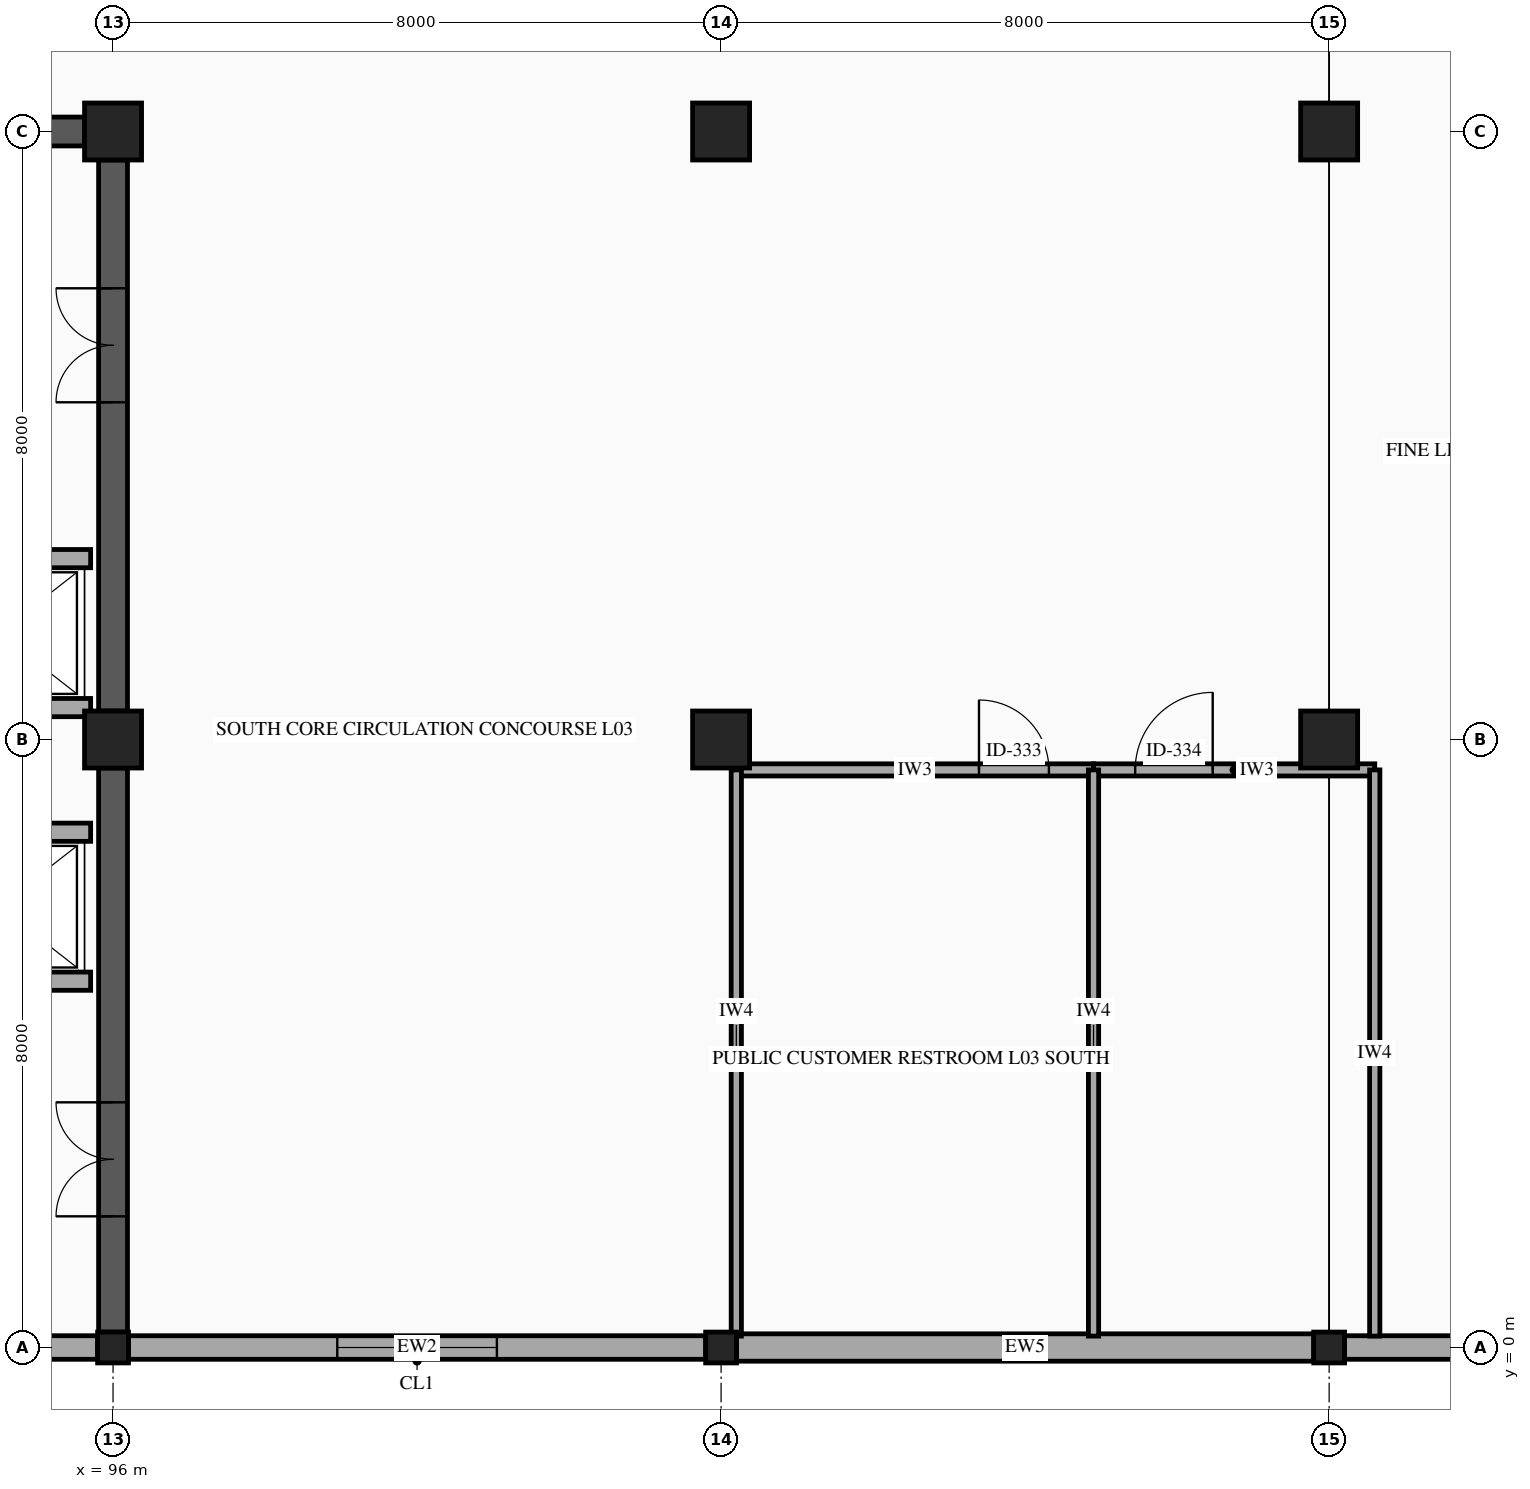
"""IFC4 building model, lengths in metres.
Left out: names, types, materials, properties, quantities, classifications, styles, units other than length and angle.
Written with IfcOpenShell. Run it as: python <this file> out.ifc"""

import sys

from ifc_helpers import new_model, si_unit, direction, frame, frame_2d, origin, origin_2d, place, context, subcontext, project, spatial, rectangle, hollow_rectangle, extrude, element, fill, save


model = new_model("IFC4")
c1 = context("Model", 3, precision=1e-05, world=origin(), true_north=direction((0.0, 1.0)))
c2 = subcontext(c1, "Body", "Model", "MODEL_VIEW")
j1 = project(units=[si_unit("LENGTHUNIT", "METRE"), si_unit("PLANEANGLEUNIT", "RADIAN")], contexts=[c1])
p1 = place(None, origin())
s1 = spatial("IfcSite", under=j1, at=p1, CompositionType="ELEMENT")
p2 = place(p1, origin())
s2 = spatial("IfcBuilding", under=s1, at=p2, CompositionType="ELEMENT")
p3 = place(p2, frame((0.0, 0.0, 14.9)))
s3 = spatial("IfcBuildingStorey", under=s2, at=p3, CompositionType="ELEMENT", Elevation=14.9)
p4 = place(p3, frame((96.0, 0.0, 0.0), z_axis=(0.0, 0.0, 1.0), x_axis=(1.0, 0.0, 0.0)))
e1 = element("IfcColumn", 1, at=p4, inside=s3, PredefinedType="COLUMN", context=c2, shape_type="SweptSolid", body=[
    extrude(hollow_rectangle(XDim=0.406, YDim=0.406, WallThickness=0.015, InnerFilletRadius=0.015, OuterFilletRadius=0.029, at=origin_2d()), origin(), (0.0, 0.0, 1.0), 4.5),
])
for number, where, z_axis, x_axis in (
    (2, (96.0, 8.0, 0.0), (0.0, 0.0, 1.0), (1.0, 0.0, 0.0)),
    (3, (96.0, 16.0, 0.0), (0.0, 0.0, 1.0), (1.0, 0.0, 0.0)),
):
    element("IfcColumn", number, at=place(p3, frame(where, z_axis=z_axis, x_axis=x_axis)), inside=s3, PredefinedType="COLUMN", context=c2, shape_type="SweptSolid", body=[
        extrude(rectangle(XDim=0.75, YDim=0.75, at=origin_2d()), origin(), (0.0, 0.0, 1.0), 4.5),
    ])
p5 = place(p3, frame((104.0, 0.0, 0.0), z_axis=(0.0, 0.0, 1.0), x_axis=(1.0, 0.0, 0.0)))
e4 = element("IfcColumn", 4, at=p5, inside=s3, PredefinedType="COLUMN", context=c2, shape_type="SweptSolid", body=[
    extrude(hollow_rectangle(XDim=0.406, YDim=0.406, WallThickness=0.015, InnerFilletRadius=0.015, OuterFilletRadius=0.029, at=origin_2d()), origin(), (0.0, 0.0, 1.0), 4.5),
])
for number, where, z_axis, x_axis in (
    (5, (104.0, 8.0, 0.0), (0.0, 0.0, 1.0), (1.0, 0.0, 0.0)),
    (6, (104.0, 16.0, 0.0), (0.0, 0.0, 1.0), (1.0, 0.0, 0.0)),
):
    element("IfcColumn", number, at=place(p3, frame(where, z_axis=z_axis, x_axis=x_axis)), inside=s3, PredefinedType="COLUMN", context=c2, shape_type="SweptSolid", body=[
        extrude(rectangle(XDim=0.75, YDim=0.75, at=origin_2d()), origin(), (0.0, 0.0, 1.0), 4.5),
    ])
p6 = place(p3, frame((112.0, 0.0, 0.0), z_axis=(0.0, 0.0, 1.0), x_axis=(1.0, 0.0, 0.0)))
e7 = element("IfcColumn", 7, at=p6, inside=s3, PredefinedType="COLUMN", context=c2, shape_type="SweptSolid", body=[
    extrude(hollow_rectangle(XDim=0.406, YDim=0.406, WallThickness=0.015, InnerFilletRadius=0.015, OuterFilletRadius=0.029, at=origin_2d()), origin(), (0.0, 0.0, 1.0), 4.5),
])
for number, where, z_axis, x_axis in (
    (8, (112.0, 8.0, 0.0), (0.0, 0.0, 1.0), (1.0, 0.0, 0.0)),
    (9, (112.0, 16.0, 0.0), (0.0, 0.0, 1.0), (1.0, 0.0, 0.0)),
):
    element("IfcColumn", number, at=place(p3, frame(where, z_axis=z_axis, x_axis=x_axis)), inside=s3, PredefinedType="COLUMN", context=c2, shape_type="SweptSolid", body=[
        extrude(rectangle(XDim=0.75, YDim=0.75, at=origin_2d()), origin(), (0.0, 0.0, 1.0), 4.5),
    ])
p7 = place(p3, frame((119.797, 0.0, 0.0), z_axis=(0.0, 0.0, 1.0), x_axis=(-1.0, 0.0, 0.0)))
e10 = element("IfcWall", 10, at=p7, inside=s3, PredefinedType="STANDARD", context=c2, shape_type="SweptSolid", body=[
    extrude(rectangle(XDim=7.594, YDim=0.31, at=frame_2d((3.797, 0.0))), origin(), (0.0, 0.0, 1.0), 3.48),
])
p8 = place(p7, frame((2.747, 0.0, 0.8)))
e11 = element("IfcOpeningElement", 11, at=p8, cuts=e10, PredefinedType="OPENING", context=c2, shape_type="SweptSolid", body=[
    extrude(rectangle(XDim=2.1, YDim=1.9, at=frame_2d((1.05, 0.95))), frame((0.0, 0.165, 0.0), z_axis=(0.0, -1.0, 0.0), x_axis=(1.0, 0.0, 0.0)), (0.0, 0.0, 1.0), 0.33),
])
p9 = place(p3, frame((111.797, 0.0, 0.0), z_axis=(0.0, 0.0, 1.0), x_axis=(-1.0, 0.0, 0.0)))
e12 = element("IfcWall", 12, at=p9, inside=s3, PredefinedType="SOLIDWALL", context=c2, shape_type="SweptSolid", body=[
    extrude(rectangle(XDim=7.594, YDim=0.36, at=frame_2d((3.797, 0.0))), origin(), (0.0, 0.0, 1.0), 3.48),
])
p10 = place(p3, frame((103.797, 0.0, 0.0), z_axis=(0.0, 0.0, 1.0), x_axis=(-1.0, 0.0, 0.0)))
e13 = element("IfcWall", 13, at=p10, inside=s3, PredefinedType="STANDARD", context=c2, shape_type="SweptSolid", body=[
    extrude(rectangle(XDim=7.594, YDim=0.31, at=frame_2d((3.797, 0.0))), origin(), (0.0, 0.0, 1.0), 3.48),
])
p11 = place(p10, frame((2.747, 0.0, 0.8)))
e14 = element("IfcOpeningElement", 14, at=p11, cuts=e13, PredefinedType="OPENING", context=c2, shape_type="SweptSolid", body=[
    extrude(rectangle(XDim=2.1, YDim=1.9, at=frame_2d((1.05, 0.95))), frame((0.0, 0.165, 0.0), z_axis=(0.0, -1.0, 0.0), x_axis=(1.0, 0.0, 0.0)), (0.0, 0.0, 1.0), 0.33),
])
p12 = place(p3, frame((95.797, 0.0, 0.0), z_axis=(0.0, 0.0, 1.0), x_axis=(-1.0, 0.0, 0.0)))
e15 = element("IfcWall", 15, at=p12, inside=s3, PredefinedType="STANDARD", context=c2, shape_type="SweptSolid", body=[
    extrude(rectangle(XDim=7.594, YDim=0.31, at=frame_2d((3.797, 0.0))), origin(), (0.0, 0.0, 1.0), 3.48),
])
p13 = place(p3, frame((88.375, 16.0, 0.0), z_axis=(0.0, 0.0, 1.0), x_axis=(1.0, 0.0, 0.0)))
e16 = element("IfcWall", 16, at=p13, inside=s3, PredefinedType="SHEAR", context=c2, shape_type="SweptSolid", body=[
    extrude(rectangle(XDim=7.25, YDim=0.38, at=frame_2d((3.625, 0.0))), origin(), (0.0, 0.0, 1.0), 4.28),
])
p14 = place(p13, frame((2.875, 0.0, 0.0)))
e17 = element("IfcOpeningElement", 17, at=p14, cuts=e16, PredefinedType="OPENING", context=c2, shape_type="SweptSolid", body=[
    extrude(rectangle(XDim=1.5, YDim=2.15, at=frame_2d((0.75, 1.075))), frame((0.0, 0.2, 0.0), z_axis=(0.0, -1.0, 0.0), x_axis=(1.0, 0.0, 0.0)), (0.0, 0.0, 1.0), 0.4),
])
p15 = place(p3, frame((96.0, 0.203, 0.0), z_axis=(0.0, 0.0, 1.0), x_axis=(0.0, 1.0, 0.0)))
e18 = element("IfcWall", 18, at=p15, inside=s3, PredefinedType="SHEAR", context=c2, shape_type="SweptSolid", body=[
    extrude(rectangle(XDim=7.422, YDim=0.38, at=frame_2d((3.711, 0.0))), origin(), (0.0, 0.0, 1.0), 4.28),
])
p16 = place(p15, frame((1.523, 0.0, 0.0)))
e19 = element("IfcOpeningElement", 19, at=p16, cuts=e18, PredefinedType="OPENING", context=c2, shape_type="SweptSolid", body=[
    extrude(rectangle(XDim=1.5, YDim=2.15, at=frame_2d((0.75, 1.075))), frame((0.0, 0.2, 0.0), z_axis=(0.0, -1.0, 0.0), x_axis=(1.0, 0.0, 0.0)), (0.0, 0.0, 1.0), 0.4),
])
p17 = place(p3, frame((96.0, 8.375, 0.0), z_axis=(0.0, 0.0, 1.0), x_axis=(0.0, 1.0, 0.0)))
e20 = element("IfcWall", 20, at=p17, inside=s3, PredefinedType="SHEAR", context=c2, shape_type="SweptSolid", body=[
    extrude(rectangle(XDim=7.25, YDim=0.38, at=frame_2d((3.625, 0.0))), origin(), (0.0, 0.0, 1.0), 4.28),
])
p18 = place(p17, frame((4.062, 0.0, 0.0)))
e21 = element("IfcOpeningElement", 21, at=p18, cuts=e20, PredefinedType="OPENING", context=c2, shape_type="SweptSolid", body=[
    extrude(rectangle(XDim=1.5, YDim=2.15, at=frame_2d((0.75, 1.075))), frame((0.0, 0.2, 0.0), z_axis=(0.0, -1.0, 0.0), x_axis=(1.0, 0.0, 0.0)), (0.0, 0.0, 1.0), 0.4),
])
p19 = place(p3, frame((93.295, 6.78, 0.0), z_axis=(0.0, 0.0, 1.0), x_axis=(1.0, 0.0, 0.0)))
e22 = element("IfcWall", 22, at=p19, inside=s3, PredefinedType="PARTITIONING", context=c2, shape_type="SweptSolid", body=[
    extrude(rectangle(XDim=2.41, YDim=0.24, at=frame_2d((1.205, 0.0))), origin(), (0.0, 0.0, 1.0), 4.28),
])
p20 = place(p19, frame((0.655, 0.0, 0.0)))
e23 = element("IfcOpeningElement", 23, at=p20, cuts=e22, PredefinedType="OPENING", context=c2, shape_type="SweptSolid", body=[
    extrude(rectangle(XDim=1.1, YDim=2.15, at=frame_2d((0.55, 1.075))), frame((0.0, 0.13, 0.0), z_axis=(0.0, -1.0, 0.0), x_axis=(1.0, 0.0, 0.0)), (0.0, 0.0, 1.0), 0.26),
])
p21 = place(p3, frame((93.295, 4.82, 0.0), z_axis=(0.0, 0.0, 1.0), x_axis=(1.0, 0.0, 0.0)))
e24 = element("IfcWall", 24, at=p21, inside=s3, PredefinedType="PARTITIONING", context=c2, shape_type="SweptSolid", body=[
    extrude(rectangle(XDim=2.41, YDim=0.24, at=frame_2d((1.205, 0.0))), origin(), (0.0, 0.0, 1.0), 4.28),
])
p22 = place(p3, frame((93.295, 10.38, 0.0), z_axis=(0.0, 0.0, 1.0), x_axis=(1.0, 0.0, 0.0)))
e25 = element("IfcWall", 25, at=p22, inside=s3, PredefinedType="PARTITIONING", context=c2, shape_type="SweptSolid", body=[
    extrude(rectangle(XDim=2.41, YDim=0.24, at=frame_2d((1.205, 0.0))), origin(), (0.0, 0.0, 1.0), 4.28),
])
p23 = place(p22, frame((0.655, 0.0, 0.0)))
e26 = element("IfcOpeningElement", 26, at=p23, cuts=e25, PredefinedType="OPENING", context=c2, shape_type="SweptSolid", body=[
    extrude(rectangle(XDim=1.1, YDim=2.15, at=frame_2d((0.55, 1.075))), frame((0.0, 0.13, 0.0), z_axis=(0.0, -1.0, 0.0), x_axis=(1.0, 0.0, 0.0)), (0.0, 0.0, 1.0), 0.26),
])
p24 = place(p3, frame((93.295, 8.42, 0.0), z_axis=(0.0, 0.0, 1.0), x_axis=(1.0, 0.0, 0.0)))
e27 = element("IfcWall", 27, at=p24, inside=s3, PredefinedType="PARTITIONING", context=c2, shape_type="SweptSolid", body=[
    extrude(rectangle(XDim=2.41, YDim=0.24, at=frame_2d((1.205, 0.0))), origin(), (0.0, 0.0, 1.0), 4.28),
])
p25 = place(p3, frame((104.2, 7.6, 0.0), z_axis=(0.0, 0.0, 1.0), x_axis=(1.0, 0.0, 0.0)))
e28 = element("IfcWall", 28, at=p25, inside=s3, PredefinedType="PARTITIONING", context=c2, shape_type="SweptSolid", body=[
    extrude(rectangle(XDim=4.7, YDim=0.16, at=frame_2d((2.35, 0.0))), origin(), (0.0, 0.0, 1.0), 3.48),
])
p26 = place(p25, frame((3.193, 0.0, 0.0)))
e29 = element("IfcOpeningElement", 29, at=p26, cuts=e28, PredefinedType="OPENING", context=c2, shape_type="SweptSolid", body=[
    extrude(rectangle(XDim=0.92, YDim=2.1, at=frame_2d((0.46, 1.05))), frame((0.0, 0.09, 0.0), z_axis=(0.0, -1.0, 0.0), x_axis=(1.0, 0.0, 0.0)), (0.0, 0.0, 1.0), 0.18),
])
p27 = place(p3, frame((108.9, 7.6, 0.0), z_axis=(0.0, 0.0, 1.0), x_axis=(1.0, 0.0, 0.0)))
e30 = element("IfcWall", 30, at=p27, inside=s3, PredefinedType="PARTITIONING", context=c2, shape_type="SweptSolid", body=[
    extrude(rectangle(XDim=3.7, YDim=0.16, at=frame_2d((1.85, 0.0))), origin(), (0.0, 0.0, 1.0), 3.48),
])
p28 = place(p27, frame((0.548, 0.0, 0.0)))
e31 = element("IfcOpeningElement", 31, at=p28, cuts=e30, PredefinedType="OPENING", context=c2, shape_type="SweptSolid", body=[
    extrude(rectangle(XDim=1.02, YDim=2.1, at=frame_2d((0.51, 1.05))), frame((0.0, 0.09, 0.0), z_axis=(0.0, -1.0, 0.0), x_axis=(1.0, 0.0, 0.0)), (0.0, 0.0, 1.0), 0.18),
])
for number, where, z_axis, x_axis in (
    (32, (104.2, 0.15, 0.0), (0.0, 0.0, 1.0), (0.0, 1.0, 0.0)),
    (33, (108.9, 0.15, 0.0), (0.0, 0.0, 1.0), (0.0, 1.0, 0.0)),
    (34, (112.6, 0.15, 0.0), (0.0, 0.0, 1.0), (0.0, 1.0, 0.0)),
):
    element("IfcWall", number, at=place(p3, frame(where, z_axis=z_axis, x_axis=x_axis)), inside=s3, PredefinedType="PARTITIONING", context=c2, shape_type="SweptSolid", body=[
        extrude(rectangle(XDim=7.45, YDim=0.135, at=frame_2d((3.725, 0.0))), origin(), (0.0, 0.0, 1.0), 3.48),
    ])
p29 = place(p11, origin())
e35 = element("IfcWindow", 35, at=p29, inside=s3, PartitioningType="DOUBLE_PANEL_VERTICAL", PredefinedType="WINDOW", context=c2, shape_type="SweptSolid", body=[
    extrude(rectangle(XDim=2.1, YDim=1.9, at=frame_2d((1.05, 0.95))), frame((0.0, 0.03, 0.0), z_axis=(0.0, -1.0, 0.0), x_axis=(1.0, 0.0, 0.0)), (0.0, 0.0, 1.0), 0.06),
])
fill(e14, e35)
p30 = place(p16, origin())
e36 = element("IfcDoor", 36, at=p30, inside=s3, OperationType="DOUBLE_DOOR_SINGLE_SWING", PredefinedType="DOOR", context=c2, shape_type="SweptSolid", body=[
    extrude(rectangle(XDim=1.5, YDim=2.15, at=frame_2d((0.75, 1.075))), frame((0.0, 0.025, 0.0), z_axis=(0.0, -1.0, 0.0), x_axis=(1.0, 0.0, 0.0)), (0.0, 0.0, 1.0), 0.05),
])
fill(e19, e36)
p31 = place(p18, origin())
e37 = element("IfcDoor", 37, at=p31, inside=s3, OperationType="DOUBLE_DOOR_SINGLE_SWING", PredefinedType="DOOR", context=c2, shape_type="SweptSolid", body=[
    extrude(rectangle(XDim=1.5, YDim=2.15, at=frame_2d((0.75, 1.075))), frame((0.0, 0.025, 0.0), z_axis=(0.0, -1.0, 0.0), x_axis=(1.0, 0.0, 0.0)), (0.0, 0.0, 1.0), 0.05),
])
fill(e21, e37)
p32 = place(p26, origin())
e38 = element("IfcDoor", 38, at=p32, inside=s3, OperationType="SINGLE_SWING_LEFT", PredefinedType="DOOR", context=c2, shape_type="SweptSolid", body=[
    extrude(rectangle(XDim=0.92, YDim=2.1, at=frame_2d((0.46, 1.05))), frame((0.0, 0.025, 0.0), z_axis=(0.0, -1.0, 0.0), x_axis=(1.0, 0.0, 0.0)), (0.0, 0.0, 1.0), 0.05),
])
fill(e29, e38)
p33 = place(p28, origin())
e39 = element("IfcDoor", 39, at=p33, inside=s3, OperationType="SINGLE_SWING_RIGHT", PredefinedType="DOOR", context=c2, shape_type="SweptSolid", body=[
    extrude(rectangle(XDim=1.02, YDim=2.1, at=frame_2d((0.51, 1.05))), frame((0.0, 0.025, 0.0), z_axis=(0.0, -1.0, 0.0), x_axis=(1.0, 0.0, 0.0)), (0.0, 0.0, 1.0), 0.05),
])
fill(e31, e39)
save(model, sys.argv[1])
